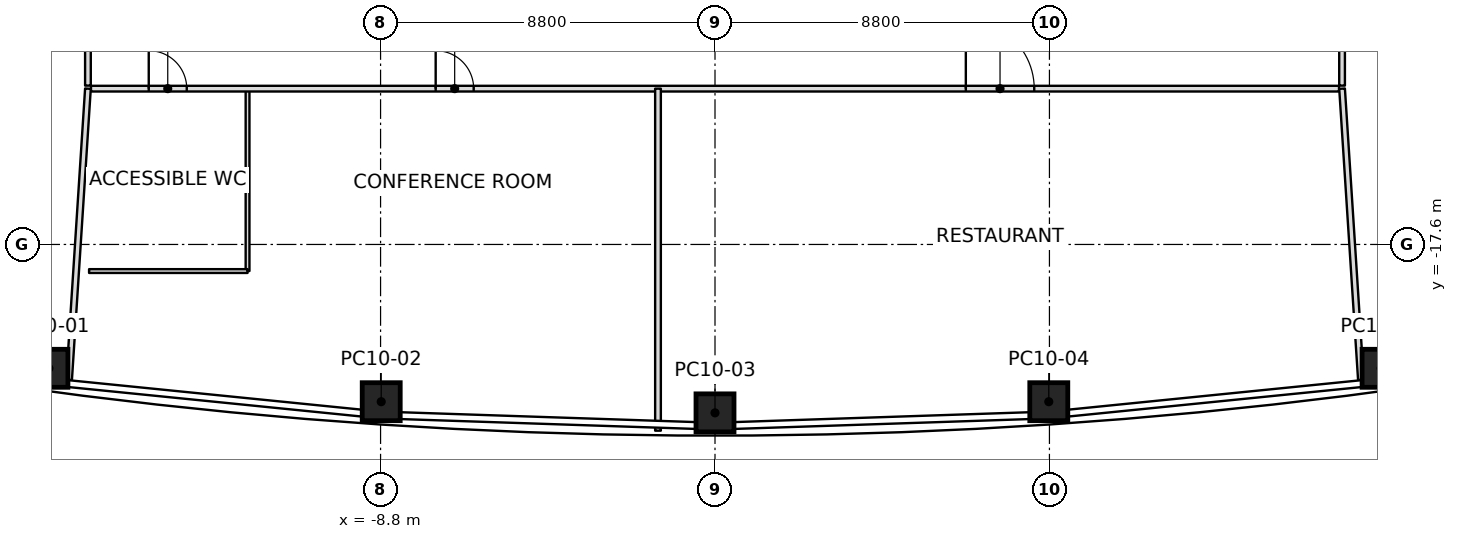
"""IFC4 building model, lengths in metres.
Left out: names, types, materials, properties, quantities, classifications, styles, units other than length and angle.
Written with IfcOpenShell. Run it as: python <this file> out.ifc"""

import sys

from ifc_helpers import new_model, si_unit, direction, frame, frame_2d, origin, origin_2d, place, context, subcontext, project, spatial, rectangle, extrude, clip, halfspace, element, fill, save


model = new_model("IFC4")
c1 = context("Model", 3, precision=1e-05, world=origin(), true_north=direction((0.0, 1.0)))
c2 = subcontext(c1, "Body", "Model", "MODEL_VIEW")
j1 = project(units=[si_unit("LENGTHUNIT", "METRE"), si_unit("PLANEANGLEUNIT", "RADIAN")], contexts=[c1])
p1 = place(None, origin())
s1 = spatial("IfcSite", under=j1, at=p1, CompositionType="ELEMENT")
p2 = place(p1, origin())
s2 = spatial("IfcBuilding", under=s1, at=p2, CompositionType="ELEMENT")
p3 = place(p2, frame((0.0, 0.0, 118.6)))
s3 = spatial("IfcBuildingStorey", under=s2, at=p3, CompositionType="ELEMENT", Elevation=118.6)
p4 = place(p3, frame((-17.527, -20.859, 0.0), z_axis=(0.009866769044, 0.005831904727, 0.999934315721), x_axis=(-0.991039650142, 0.133264324033, 0.009001765775)))
e1 = element("IfcColumn", 1, at=p4, inside=s3, PredefinedType="COLUMN", context=c2, shape_type="SweptSolid", body=[
    clip(clip(extrude(rectangle(XDim=1.0, YDim=1.0, at=origin_2d()), origin(), (0.0, 0.0, 1.0), 7.2), halfspace(frame((0.0, 0.0, 0.002)), True)), halfspace(frame((0.0, 0.0, 7.197)), False)),
])
p5 = place(p3, frame((-8.783, -21.738, 0.0), z_axis=(0.004916599143, 0.006238994774, 0.999968450501), x_axis=(-0.997757484586, 0.066782110438, 0.004489061983)))
e2 = element("IfcColumn", 2, at=p5, inside=s3, PredefinedType="COLUMN", context=c2, shape_type="SweptSolid", body=[
    clip(clip(extrude(rectangle(XDim=1.0, YDim=1.0, at=origin_2d()), origin(), (0.0, 0.0, 1.0), 7.2), halfspace(frame((0.0, 0.0, 0.002)), True)), halfspace(frame((0.0, 0.0, 7.198)), False)),
])
p6 = place(p3, frame((0.0, -22.031, 0.0), z_axis=(0.0, 0.006374696691, 0.999979681415), x_axis=(1.0, 0.0, 0.0)))
e3 = element("IfcColumn", 3, at=p6, inside=s3, PredefinedType="COLUMN", context=c2, shape_type="SweptSolid", body=[
    clip(clip(extrude(rectangle(XDim=1.0, YDim=1.0, at=origin_2d()), origin(), (0.0, 0.0, 1.0), 7.2), halfspace(frame((0.0, 0.0, 0.002)), True)), halfspace(frame((0.0, 0.0, 7.198)), False)),
])
p7 = place(p3, frame((8.783, -21.738, 0.0), z_axis=(-0.004916599143, 0.006238994774, 0.999968450501), x_axis=(0.997757484586, 0.066782110438, 0.004489061983)))
e4 = element("IfcColumn", 4, at=p7, inside=s3, PredefinedType="COLUMN", context=c2, shape_type="SweptSolid", body=[
    clip(clip(extrude(rectangle(XDim=1.0, YDim=1.0, at=origin_2d()), origin(), (0.0, 0.0, 1.0), 7.2), halfspace(frame((0.0, 0.0, 0.002)), True)), halfspace(frame((0.0, 0.0, 7.198)), False)),
])
p8 = place(p3, frame((17.527, -20.859, 0.0), z_axis=(-0.009866769044, 0.005831904727, 0.999934315721), x_axis=(0.991039650142, 0.133264324033, 0.009001765775)))
e5 = element("IfcColumn", 5, at=p8, inside=s3, PredefinedType="COLUMN", context=c2, shape_type="SweptSolid", body=[
    clip(clip(extrude(rectangle(XDim=1.0, YDim=1.0, at=origin_2d()), origin(), (0.0, 0.0, 1.0), 7.2), halfspace(frame((0.0, 0.0, 0.002)), True)), halfspace(frame((0.0, 0.0, 7.197)), False)),
])
p9 = place(p3, frame((-16.5, -13.5, 0.0), z_axis=(0.0, 0.0, 1.0), x_axis=(-0.064628390645, -0.997909400258, 0.0)))
e6 = element("IfcWall", 6, at=p9, inside=s3, PredefinedType="PARTITIONING", context=c2, shape_type="SweptSolid", body=[
    extrude(rectangle(XDim=7.68, YDim=0.15, at=frame_2d((3.84, 0.0))), origin(), (0.0, 0.0, 1.0), 6.434),
])
p10 = place(p3, frame((-1.5, -13.5, 0.0), z_axis=(0.0, 0.0, 1.0), x_axis=(0.0, -1.0, 0.0)))
e7 = element("IfcWall", 7, at=p10, inside=s3, PredefinedType="PARTITIONING", context=c2, shape_type="SweptSolid", body=[
    extrude(rectangle(XDim=9.0, YDim=0.15, at=frame_2d((4.5, 0.0))), origin(), (0.0, 0.0, 1.0), 6.434),
])
p11 = place(p3, frame((16.5, -13.5, 0.0), z_axis=(0.0, 0.0, 1.0), x_axis=(0.064628390645, -0.997909400258, 0.0)))
e8 = element("IfcWall", 8, at=p11, inside=s3, PredefinedType="PARTITIONING", context=c2, shape_type="SweptSolid", body=[
    extrude(rectangle(XDim=7.68, YDim=0.15, at=frame_2d((3.84, 0.0))), origin(), (0.0, 0.0, 1.0), 6.284),
])
p12 = place(p3, frame((-16.5, 13.42, 0.0), z_axis=(0.0, 0.0, 1.0), x_axis=(0.0, -1.0, 0.0)))
e9 = element("IfcWall", 9, at=p12, inside=s3, PredefinedType="PARTITIONING", context=c2, shape_type="SweptSolid", body=[
    extrude(rectangle(XDim=26.84, YDim=0.15, at=frame_2d((13.42, 0.0))), origin(), (0.0, 0.0, 1.0), 6.366),
])
p13 = place(p12, frame((12.93, 0.0, 0.0)))
e10 = element("IfcOpeningElement", 10, at=p13, cuts=e9, PredefinedType="OPENING", context=c2, shape_type="SweptSolid", body=[
    extrude(rectangle(XDim=1.0, YDim=2.1, at=frame_2d((0.5, 1.05))), frame((0.0, 0.075, 0.0), z_axis=(0.0, -1.0, 0.0), x_axis=(1.0, 0.0, 0.0)), (0.0, 0.0, 1.0), 0.15),
])
p14 = place(p3, frame((-16.42, -13.5, 0.0), z_axis=(0.0, 0.0, 1.0), x_axis=(1.0, 0.0, 0.0)))
e11 = element("IfcWall", 11, at=p14, inside=s3, PredefinedType="PARTITIONING", context=c2, shape_type="SweptSolid", body=[
    extrude(rectangle(XDim=32.84, YDim=0.15, at=frame_2d((16.42, 0.0))), origin(), (0.0, 0.0, 1.0), 6.443),
])
p15 = place(p14, frame((1.52, 0.0, 0.0)))
e12 = element("IfcOpeningElement", 12, at=p15, cuts=e11, PredefinedType="OPENING", context=c2, shape_type="SweptSolid", body=[
    extrude(rectangle(XDim=1.0, YDim=2.1, at=frame_2d((0.5, 1.05))), frame((0.0, 0.075, 0.0), z_axis=(0.0, -1.0, 0.0), x_axis=(1.0, 0.0, 0.0)), (0.0, 0.0, 1.0), 0.15),
])
p16 = place(p14, frame((9.07, 0.0, 0.0)))
e13 = element("IfcOpeningElement", 13, at=p16, cuts=e11, PredefinedType="OPENING", context=c2, shape_type="SweptSolid", body=[
    extrude(rectangle(XDim=1.0, YDim=2.1, at=frame_2d((0.5, 1.05))), frame((0.0, 0.075, 0.0), z_axis=(0.0, -1.0, 0.0), x_axis=(1.0, 0.0, 0.0)), (0.0, 0.0, 1.0), 0.15),
])
p17 = place(p14, frame((23.02, 0.0, 0.0)))
e14 = element("IfcOpeningElement", 14, at=p17, cuts=e11, PredefinedType="OPENING", context=c2, shape_type="SweptSolid", body=[
    extrude(rectangle(XDim=1.8, YDim=2.1, at=frame_2d((0.9, 1.05))), frame((0.0, 0.075, 0.0), z_axis=(0.0, -1.0, 0.0), x_axis=(1.0, 0.0, 0.0)), (0.0, 0.0, 1.0), 0.15),
])
p18 = place(p3, frame((16.5, -13.42, 0.0), z_axis=(0.0, 0.0, 1.0), x_axis=(0.0, 1.0, 0.0)))
e15 = element("IfcWall", 15, at=p18, inside=s3, PredefinedType="PARTITIONING", context=c2, shape_type="SweptSolid", body=[
    extrude(rectangle(XDim=26.84, YDim=0.15, at=frame_2d((13.42, 0.0))), origin(), (0.0, 0.0, 1.0), 6.297),
])
p19 = place(p18, frame((10.52, 0.0, 0.0)))
e16 = element("IfcOpeningElement", 16, at=p19, cuts=e15, PredefinedType="OPENING", context=c2, shape_type="SweptSolid", body=[
    extrude(rectangle(XDim=1.0, YDim=2.1, at=frame_2d((0.5, 1.05))), frame((0.0, 0.075, 0.0), z_axis=(0.0, -1.0, 0.0), x_axis=(1.0, 0.0, 0.0)), (0.0, 0.0, 1.0), 0.15),
])
p20 = place(p18, frame((19.57, 0.0, 0.0)))
e17 = element("IfcOpeningElement", 17, at=p20, cuts=e15, PredefinedType="OPENING", context=c2, shape_type="SweptSolid", body=[
    extrude(rectangle(XDim=1.0, YDim=2.1, at=frame_2d((0.5, 1.05))), frame((0.0, 0.075, 0.0), z_axis=(0.0, -1.0, 0.0), x_axis=(1.0, 0.0, 0.0)), (0.0, 0.0, 1.0), 0.15),
])
p21 = place(p18, frame((3.71, 0.0, 0.0)))
e18 = element("IfcOpeningElement", 18, at=p21, cuts=e15, PredefinedType="OPENING", context=c2, shape_type="SweptSolid", body=[
    extrude(rectangle(XDim=1.4, YDim=2.1, at=frame_2d((0.7, 1.05))), frame((0.0, 0.075, 0.0), z_axis=(0.0, -1.0, 0.0), x_axis=(1.0, 0.0, 0.0)), (0.0, 0.0, 1.0), 0.15),
])
p22 = place(p3, frame((-12.3, -13.53, 0.0), z_axis=(0.0, 0.0, 1.0), x_axis=(0.0, -1.0, 0.0)))
e19 = element("IfcWall", 19, at=p22, inside=s3, PredefinedType="PARTITIONING", context=c2, shape_type="SweptSolid", body=[
    extrude(rectangle(XDim=4.77, YDim=0.1, at=frame_2d((2.385, 0.0))), origin(), (0.0, 0.0, 1.0), 6.5),
])
p23 = place(p3, frame((-12.3, -18.3, 0.0), z_axis=(0.0, 0.0, 1.0), x_axis=(-1.0, 0.0, 0.0)))
e20 = element("IfcWall", 20, at=p23, inside=s3, PredefinedType="PARTITIONING", context=c2, shape_type="SweptSolid", body=[
    extrude(rectangle(XDim=4.17, YDim=0.1, at=frame_2d((2.085, 0.0))), origin(), (0.0, 0.0, 1.0), 6.5),
])
p24 = place(p15, origin())
e21 = element("IfcDoor", 21, at=p24, inside=s3, OperationType="SINGLE_SWING_RIGHT", PredefinedType="DOOR", context=c2, shape_type="SweptSolid", body=[
    extrude(rectangle(XDim=1.0, YDim=2.1, at=frame_2d((0.5, 1.05))), frame((0.0, 0.025, 0.0), z_axis=(0.0, -1.0, 0.0), x_axis=(1.0, 0.0, 0.0)), (0.0, 0.0, 1.0), 0.05),
])
fill(e12, e21)
p25 = place(p16, origin())
e22 = element("IfcDoor", 22, at=p25, inside=s3, OperationType="SINGLE_SWING_LEFT", PredefinedType="DOOR", context=c2, shape_type="SweptSolid", body=[
    extrude(rectangle(XDim=1.0, YDim=2.1, at=frame_2d((0.5, 1.05))), frame((0.0, 0.025, 0.0), z_axis=(0.0, -1.0, 0.0), x_axis=(1.0, 0.0, 0.0)), (0.0, 0.0, 1.0), 0.05),
])
fill(e13, e22)
p26 = place(p17, origin())
e23 = element("IfcDoor", 23, at=p26, inside=s3, OperationType="DOUBLE_DOOR_SINGLE_SWING", PredefinedType="DOOR", context=c2, shape_type="SweptSolid", body=[
    extrude(rectangle(XDim=1.8, YDim=2.1, at=frame_2d((0.9, 1.05))), frame((0.0, 0.025, 0.0), z_axis=(0.0, -1.0, 0.0), x_axis=(1.0, 0.0, 0.0)), (0.0, 0.0, 1.0), 0.05),
])
fill(e14, e23)
save(model, sys.argv[1])
